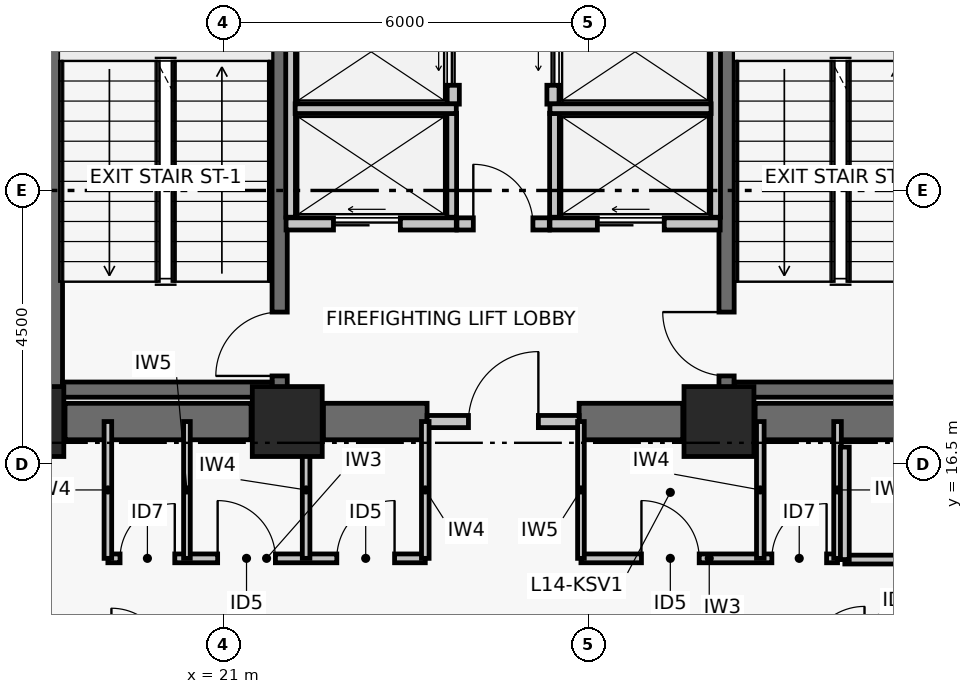
"""IFC4 building model, lengths in metres.
Left out: names, types, materials, properties, quantities, classifications, styles, units other than length and angle.
Written with IfcOpenShell. Run it as: python <this file> out.ifc"""

import sys

from ifc_helpers import new_model, si_unit, direction, frame, frame_2d, origin, origin_2d, place, context, subcontext, project, spatial, rectangle, extrude, element, fill, save


model = new_model("IFC4")
c1 = context("Model", 3, precision=1e-05, world=origin(), true_north=direction((0.0, 1.0)))
c2 = subcontext(c1, "Body", "Model", "MODEL_VIEW")
j1 = project(units=[si_unit("LENGTHUNIT", "METRE"), si_unit("PLANEANGLEUNIT", "RADIAN")], contexts=[c1])
p1 = place(None, origin())
s1 = spatial("IfcSite", under=j1, at=p1, CompositionType="ELEMENT")
p2 = place(p1, origin())
s2 = spatial("IfcBuilding", under=s1, at=p2, CompositionType="ELEMENT")
p3 = place(p2, frame((0.0, 0.0, 61.08)))
s3 = spatial("IfcBuildingStorey", under=s2, at=p3, CompositionType="ELEMENT", Elevation=61.08)
for number, where, z_axis, x_axis in (
    (1, (17.8, 17.2, 0.0), (0.0, 0.0, 1.0), (1.0, 0.0, 0.0)),
    (2, (22.05, 17.2, 0.0), (0.0, 0.0, 1.0), (1.0, 0.0, 0.0)),
    (3, (29.15, 17.2, 0.0), (0.0, 0.0, 1.0), (1.0, 0.0, 0.0)),
):
    element("IfcColumn", number, at=place(p3, frame(where, z_axis=z_axis, x_axis=x_axis)), inside=s3, PredefinedType="COLUMN", context=c2, shape_type="SweptSolid", body=[
        extrude(rectangle(XDim=1.15, YDim=1.15, at=origin_2d()), origin(), (0.0, 0.0, 1.0), 3.72),
    ])
p4 = place(p3, frame((18.395, 17.2, 0.0), z_axis=(0.0, 0.0, 1.0), x_axis=(1.0, 0.0, 0.0)))
e4 = element("IfcWall", 4, at=p4, inside=s3, PredefinedType="SHEAR", context=c2, shape_type="SweptSolid", body=[
    extrude(rectangle(XDim=3.06, YDim=0.6, at=frame_2d((1.53, 0.0))), origin(), (0.0, 0.0, 1.0), 3.47),
])
p5 = place(p3, frame((22.645, 17.2, 0.0), z_axis=(0.0, 0.0, 1.0), x_axis=(1.0, 0.0, 0.0)))
e5 = element("IfcWall", 5, at=p5, inside=s3, PredefinedType="SHEAR", context=c2, shape_type="SweptSolid", body=[
    extrude(rectangle(XDim=1.705, YDim=0.6, at=frame_2d((0.853, 0.0))), origin(), (0.0, 0.0, 1.0), 3.47),
])
p6 = place(p3, frame((26.85, 17.2, 0.0), z_axis=(0.0, 0.0, 1.0), x_axis=(1.0, 0.0, 0.0)))
e6 = element("IfcWall", 6, at=p6, inside=s3, PredefinedType="SHEAR", context=c2, shape_type="SweptSolid", body=[
    extrude(rectangle(XDim=1.705, YDim=0.6, at=frame_2d((0.853, 0.0))), origin(), (0.0, 0.0, 1.0), 3.47),
])
p7 = place(p3, frame((29.745, 17.2, 0.0), z_axis=(0.0, 0.0, 1.0), x_axis=(1.0, 0.0, 0.0)))
e7 = element("IfcWall", 7, at=p7, inside=s3, PredefinedType="SHEAR", context=c2, shape_type="SweptSolid", body=[
    extrude(rectangle(XDim=3.06, YDim=0.6, at=frame_2d((1.53, 0.0))), origin(), (0.0, 0.0, 1.0), 3.47),
])
p8 = place(p3, frame((18.229, 17.6, 0.0), z_axis=(0.0, 0.0, 1.0), x_axis=(0.0, 1.0, 0.0)))
e8 = element("IfcWall", 8, at=p8, inside=s3, PredefinedType="SHEAR", context=c2, shape_type="SweptSolid", body=[
    extrude(rectangle(XDim=8.8, YDim=0.25, at=frame_2d((4.4, 0.0))), origin(), (0.0, 0.0, 1.0), 3.47),
])
p9 = place(p3, frame((21.925, 17.6, 0.0), z_axis=(0.0, 0.0, 1.0), x_axis=(0.0, 1.0, 0.0)))
e9 = element("IfcWall", 9, at=p9, inside=s3, PredefinedType="SHEAR", context=c2, shape_type="SweptSolid", body=[
    extrude(rectangle(XDim=8.8, YDim=0.25, at=frame_2d((4.4, 0.0))), origin(), (0.0, 0.0, 1.0), 3.47),
])
p10 = place(p9, frame((0.35, 0.0, 0.0)))
e10 = element("IfcOpeningElement", 10, at=p10, cuts=e9, PredefinedType="OPENING", context=c2, shape_type="SweptSolid", body=[
    extrude(rectangle(XDim=1.05, YDim=2.08, at=frame_2d((0.525, 1.04))), frame((0.0, 0.135, 0.0), z_axis=(0.0, -1.0, 0.0), x_axis=(1.0, 0.0, 0.0)), (0.0, 0.0, 1.0), 0.27),
])
p11 = place(p3, frame((18.354, 17.725, 0.0), z_axis=(0.0, 0.0, 1.0), x_axis=(1.0, 0.0, 0.0)))
e11 = element("IfcWall", 11, at=p11, inside=s3, PredefinedType="SHEAR", context=c2, shape_type="SweptSolid", body=[
    extrude(rectangle(XDim=3.446, YDim=0.25, at=frame_2d((1.723, 0.0))), origin(), (0.0, 0.0, 1.0), 3.47),
])
p12 = place(p3, frame((29.275, 17.6, 0.0), z_axis=(0.0, 0.0, 1.0), x_axis=(0.0, 1.0, 0.0)))
e12 = element("IfcWall", 12, at=p12, inside=s3, PredefinedType="SHEAR", context=c2, shape_type="SweptSolid", body=[
    extrude(rectangle(XDim=8.8, YDim=0.25, at=frame_2d((4.4, 0.0))), origin(), (0.0, 0.0, 1.0), 3.47),
])
p13 = place(p12, frame((0.35, 0.0, 0.0)))
e13 = element("IfcOpeningElement", 13, at=p13, cuts=e12, PredefinedType="OPENING", context=c2, shape_type="SweptSolid", body=[
    extrude(rectangle(XDim=1.05, YDim=2.08, at=frame_2d((0.525, 1.04))), frame((0.0, 0.135, 0.0), z_axis=(0.0, -1.0, 0.0), x_axis=(1.0, 0.0, 0.0)), (0.0, 0.0, 1.0), 0.27),
])
p14 = place(p3, frame((29.4, 17.725, 0.0), z_axis=(0.0, 0.0, 1.0), x_axis=(1.0, 0.0, 0.0)))
e14 = element("IfcWall", 14, at=p14, inside=s3, PredefinedType="SHEAR", context=c2, shape_type="SweptSolid", body=[
    extrude(rectangle(XDim=3.446, YDim=0.25, at=frame_2d((1.723, 0.0))), origin(), (0.0, 0.0, 1.0), 3.47),
])
p15 = place(p3, frame((24.35, 17.2, 0.0), z_axis=(0.0, 0.0, 1.0), x_axis=(1.0, 0.0, 0.0)))
e15 = element("IfcWall", 15, at=p15, inside=s3, PredefinedType="PARTITIONING", context=c2, shape_type="SweptSolid", body=[
    extrude(rectangle(XDim=2.5, YDim=0.2, at=frame_2d((1.25, 0.0))), origin(), (0.0, 0.0, 1.0), 2.6),
])
p16 = place(p15, frame((0.68, 0.0, 0.0)))
e16 = element("IfcOpeningElement", 16, at=p16, cuts=e15, PredefinedType="OPENING", context=c2, shape_type="SweptSolid", body=[
    extrude(rectangle(XDim=1.15, YDim=2.08, at=frame_2d((0.575, 1.04))), frame((0.0, 0.11, 0.0), z_axis=(0.0, -1.0, 0.0), x_axis=(1.0, 0.0, 0.0)), (0.0, 0.0, 1.0), 0.22),
])
p17 = place(p3, frame((24.84, 20.45, 0.0), z_axis=(0.0, 0.0, 1.0), x_axis=(1.0, 0.0, 0.0)))
e17 = element("IfcWall", 17, at=p17, inside=s3, PredefinedType="PARTITIONING", context=c2, shape_type="SweptSolid", body=[
    extrude(rectangle(XDim=1.52, YDim=0.2, at=frame_2d((0.76, 0.0))), origin(), (0.0, 0.0, 1.0), 3.47),
])
p18 = place(p17, frame((0.27, 0.0, 0.0)))
e18 = element("IfcOpeningElement", 18, at=p18, cuts=e17, PredefinedType="OPENING", context=c2, shape_type="SweptSolid", body=[
    extrude(rectangle(XDim=0.98, YDim=2.06, at=frame_2d((0.49, 1.03))), frame((0.0, 0.11, 0.0), z_axis=(0.0, -1.0, 0.0), x_axis=(1.0, 0.0, 0.0)), (0.0, 0.0, 1.0), 0.22),
])
p19 = place(p3, frame((22.03, 20.45, 0.0), z_axis=(0.0, 0.0, 1.0), x_axis=(1.0, 0.0, 0.0)))
e19 = element("IfcWall", 19, at=p19, inside=s3, PredefinedType="PARTITIONING", context=c2, shape_type="SweptSolid", body=[
    extrude(rectangle(XDim=2.8, YDim=0.2, at=frame_2d((1.4, 0.0))), origin(), (0.0, 0.0, 1.0), 3.47),
])
p20 = place(p19, frame((0.78, 0.0, 0.0)))
e20 = element("IfcOpeningElement", 20, at=p20, cuts=e19, PredefinedType="OPENING", context=c2, shape_type="SweptSolid", body=[
    extrude(rectangle(XDim=1.1, YDim=2.08, at=frame_2d((0.55, 1.04))), frame((0.0, 0.11, 0.0), z_axis=(0.0, -1.0, 0.0), x_axis=(1.0, 0.0, 0.0)), (0.0, 0.0, 1.0), 0.22),
])
p21 = place(p3, frame((26.37, 20.45, 0.0), z_axis=(0.0, 0.0, 1.0), x_axis=(1.0, 0.0, 0.0)))
e21 = element("IfcWall", 21, at=p21, inside=s3, PredefinedType="PARTITIONING", context=c2, shape_type="SweptSolid", body=[
    extrude(rectangle(XDim=2.8, YDim=0.2, at=frame_2d((1.4, 0.0))), origin(), (0.0, 0.0, 1.0), 3.47),
])
p22 = place(p21, frame((0.78, 0.0, 0.0)))
e22 = element("IfcOpeningElement", 22, at=p22, cuts=e21, PredefinedType="OPENING", context=c2, shape_type="SweptSolid", body=[
    extrude(rectangle(XDim=1.1, YDim=2.08, at=frame_2d((0.55, 1.04))), frame((0.0, 0.11, 0.0), z_axis=(0.0, -1.0, 0.0), x_axis=(1.0, 0.0, 0.0)), (0.0, 0.0, 1.0), 0.22),
])
p23 = place(p3, frame((24.78, 22.42, 0.0), z_axis=(0.0, 0.0, 1.0), x_axis=(0.0, 1.0, 0.0)))
e23 = element("IfcWall", 23, at=p23, inside=s3, PredefinedType="PARTITIONING", context=c2, shape_type="SweptSolid", body=[
    extrude(rectangle(XDim=1.72, YDim=0.2, at=frame_2d((0.86, 0.0))), origin(), (0.0, 0.0, 1.0), 3.47),
])
p24 = place(p23, frame((0.31, 0.0, 0.0)))
e24 = element("IfcOpeningElement", 24, at=p24, cuts=e23, PredefinedType="OPENING", context=c2, shape_type="SweptSolid", body=[
    extrude(rectangle(XDim=1.1, YDim=2.08, at=frame_2d((0.55, 1.04))), frame((0.0, 0.11, 0.0), z_axis=(0.0, -1.0, 0.0), x_axis=(1.0, 0.0, 0.0)), (0.0, 0.0, 1.0), 0.22),
])
p25 = place(p3, frame((26.42, 22.42, 0.0), z_axis=(0.0, 0.0, 1.0), x_axis=(0.0, 1.0, 0.0)))
e25 = element("IfcWall", 25, at=p25, inside=s3, PredefinedType="PARTITIONING", context=c2, shape_type="SweptSolid", body=[
    extrude(rectangle(XDim=1.72, YDim=0.2, at=frame_2d((0.86, 0.0))), origin(), (0.0, 0.0, 1.0), 3.47),
])
p26 = place(p25, frame((0.31, 0.0, 0.0)))
e26 = element("IfcOpeningElement", 26, at=p26, cuts=e25, PredefinedType="OPENING", context=c2, shape_type="SweptSolid", body=[
    extrude(rectangle(XDim=1.1, YDim=2.08, at=frame_2d((0.55, 1.04))), frame((0.0, 0.11, 0.0), z_axis=(0.0, -1.0, 0.0), x_axis=(1.0, 0.0, 0.0)), (0.0, 0.0, 1.0), 0.22),
])
p27 = place(p3, frame((22.105, 20.56, 0.0), z_axis=(0.0, 0.0, 1.0), x_axis=(0.0, 1.0, 0.0)))
e27 = element("IfcWall", 27, at=p27, inside=s3, PredefinedType="PARTITIONING", context=c2, shape_type="SweptSolid", body=[
    extrude(rectangle(XDim=5.45, YDim=0.16, at=frame_2d((2.725, 0.0))), origin(), (0.0, 0.0, 1.0), 3.47),
])
p28 = place(p3, frame((24.755, 20.56, 0.0), z_axis=(0.0, 0.0, 1.0), x_axis=(0.0, 1.0, 0.0)))
e28 = element("IfcWall", 28, at=p28, inside=s3, PredefinedType="PARTITIONING", context=c2, shape_type="SweptSolid", body=[
    extrude(rectangle(XDim=1.71, YDim=0.16, at=frame_2d((0.855, 0.0))), origin(), (0.0, 0.0, 1.0), 3.47),
])
p29 = place(p3, frame((22.18, 22.345, 0.0), z_axis=(0.0, 0.0, 1.0), x_axis=(1.0, 0.0, 0.0)))
e29 = element("IfcWall", 29, at=p29, inside=s3, PredefinedType="PARTITIONING", context=c2, shape_type="SweptSolid", body=[
    extrude(rectangle(XDim=2.65, YDim=0.16, at=frame_2d((1.325, 0.0))), origin(), (0.0, 0.0, 1.0), 3.47),
])
p30 = place(p3, frame((29.095, 20.56, 0.0), z_axis=(0.0, 0.0, 1.0), x_axis=(0.0, 1.0, 0.0)))
e30 = element("IfcWall", 30, at=p30, inside=s3, PredefinedType="PARTITIONING", context=c2, shape_type="SweptSolid", body=[
    extrude(rectangle(XDim=5.45, YDim=0.16, at=frame_2d((2.725, 0.0))), origin(), (0.0, 0.0, 1.0), 3.47),
])
p31 = place(p3, frame((26.445, 20.56, 0.0), z_axis=(0.0, 0.0, 1.0), x_axis=(0.0, 1.0, 0.0)))
e31 = element("IfcWall", 31, at=p31, inside=s3, PredefinedType="PARTITIONING", context=c2, shape_type="SweptSolid", body=[
    extrude(rectangle(XDim=1.71, YDim=0.16, at=frame_2d((0.855, 0.0))), origin(), (0.0, 0.0, 1.0), 3.47),
])
p32 = place(p3, frame((26.37, 22.345, 0.0), z_axis=(0.0, 0.0, 1.0), x_axis=(1.0, 0.0, 0.0)))
e32 = element("IfcWall", 32, at=p32, inside=s3, PredefinedType="PARTITIONING", context=c2, shape_type="SweptSolid", body=[
    extrude(rectangle(XDim=2.65, YDim=0.16, at=frame_2d((1.325, 0.0))), origin(), (0.0, 0.0, 1.0), 3.47),
])
p33 = place(p3, frame((19.1, 14.95, 0.0), z_axis=(0.0, 0.0, 1.0), x_axis=(1.0, 0.0, 0.0)))
e33 = element("IfcWall", 33, at=p33, inside=s3, PredefinedType="PARTITIONING", context=c2, shape_type="SweptSolid", body=[
    extrude(rectangle(XDim=5.22, YDim=0.145, at=frame_2d((2.61, 0.0))), origin(), (0.0, 0.0, 1.0), 2.6),
])
p34 = place(p33, frame((0.2, 0.0, 0.0)))
e34 = element("IfcOpeningElement", 34, at=p34, cuts=e33, PredefinedType="OPENING", context=c2, shape_type="SweptSolid", body=[
    extrude(rectangle(XDim=0.9, YDim=2.02, at=frame_2d((0.45, 1.01))), frame((0.0, 0.083, 0.0), z_axis=(0.0, -1.0, 0.0), x_axis=(1.0, 0.0, 0.0)), (0.0, 0.0, 1.0), 0.165),
])
p35 = place(p33, frame((1.805, 0.0, 0.0)))
e35 = element("IfcOpeningElement", 35, at=p35, cuts=e33, PredefinedType="OPENING", context=c2, shape_type="SweptSolid", body=[
    extrude(rectangle(XDim=0.95, YDim=2.06, at=frame_2d((0.475, 1.03))), frame((0.0, 0.083, 0.0), z_axis=(0.0, -1.0, 0.0), x_axis=(1.0, 0.0, 0.0)), (0.0, 0.0, 1.0), 0.165),
])
p36 = place(p33, frame((3.765, 0.0, 0.0)))
e36 = element("IfcOpeningElement", 36, at=p36, cuts=e33, PredefinedType="OPENING", context=c2, shape_type="SweptSolid", body=[
    extrude(rectangle(XDim=0.95, YDim=2.06, at=frame_2d((0.475, 1.03))), frame((0.0, 0.083, 0.0), z_axis=(0.0, -1.0, 0.0), x_axis=(1.0, 0.0, 0.0)), (0.0, 0.0, 1.0), 0.165),
])
p37 = place(p3, frame((26.88, 14.95, 0.0), z_axis=(0.0, 0.0, 1.0), x_axis=(1.0, 0.0, 0.0)))
e37 = element("IfcWall", 37, at=p37, inside=s3, PredefinedType="PARTITIONING", context=c2, shape_type="SweptSolid", body=[
    extrude(rectangle(XDim=4.22, YDim=0.145, at=frame_2d((2.11, 0.0))), origin(), (0.0, 0.0, 1.0), 3.0),
])
p38 = place(p37, frame((0.995, 0.0, 0.0)))
e38 = element("IfcOpeningElement", 38, at=p38, cuts=e37, PredefinedType="OPENING", context=c2, shape_type="SweptSolid", body=[
    extrude(rectangle(XDim=0.95, YDim=2.06, at=frame_2d((0.475, 1.03))), frame((0.0, 0.083, 0.0), z_axis=(0.0, -1.0, 0.0), x_axis=(1.0, 0.0, 0.0)), (0.0, 0.0, 1.0), 0.165),
])
p39 = place(p37, frame((3.14, 0.0, 0.0)))
e39 = element("IfcOpeningElement", 39, at=p39, cuts=e37, PredefinedType="OPENING", context=c2, shape_type="SweptSolid", body=[
    extrude(rectangle(XDim=0.9, YDim=2.02, at=frame_2d((0.45, 1.01))), frame((0.0, 0.083, 0.0), z_axis=(0.0, -1.0, 0.0), x_axis=(1.0, 0.0, 0.0)), (0.0, 0.0, 1.0), 0.165),
])
p40 = place(p3, frame((19.1, 14.95, 0.0), z_axis=(0.0, 0.0, 1.0), x_axis=(0.0, 1.0, 0.0)))
e40 = element("IfcWall", 40, at=p40, inside=s3, PredefinedType="PARTITIONING", context=c2, shape_type="SweptSolid", body=[
    extrude(rectangle(XDim=2.25, YDim=0.125, at=frame_2d((1.125, 0.0))), origin(), (0.0, 0.0, 1.0), 2.6),
])
p41 = place(p3, frame((20.4, 14.95, 0.0), z_axis=(0.0, 0.0, 1.0), x_axis=(0.0, 1.0, 0.0)))
e41 = element("IfcWall", 41, at=p41, inside=s3, PredefinedType="PARTITIONING", context=c2, shape_type="SweptSolid", body=[
    extrude(rectangle(XDim=2.25, YDim=0.11, at=frame_2d((1.125, 0.0))), origin(), (0.0, 0.0, 1.0), 2.6),
])
for number, where, z_axis, x_axis in (
    (42, (22.36, 14.95, 0.0), (0.0, 0.0, 1.0), (0.0, 1.0, 0.0)),
    (43, (24.32, 14.95, 0.0), (0.0, 0.0, 1.0), (0.0, 1.0, 0.0)),
):
    element("IfcWall", number, at=place(p3, frame(where, z_axis=z_axis, x_axis=x_axis)), inside=s3, PredefinedType="PARTITIONING", context=c2, shape_type="SweptSolid", body=[
        extrude(rectangle(XDim=2.25, YDim=0.125, at=frame_2d((1.125, 0.0))), origin(), (0.0, 0.0, 1.0), 2.6),
    ])
p42 = place(p3, frame((26.88, 14.95, 0.0), z_axis=(0.0, 0.0, 1.0), x_axis=(0.0, 1.0, 0.0)))
e44 = element("IfcWall", 44, at=p42, inside=s3, PredefinedType="PARTITIONING", context=c2, shape_type="SweptSolid", body=[
    extrude(rectangle(XDim=2.25, YDim=0.11, at=frame_2d((1.125, 0.0))), origin(), (0.0, 0.0, 1.0), 2.6),
])
for number, where, z_axis, x_axis in (
    (45, (29.83, 14.95, 0.0), (0.0, 0.0, 1.0), (0.0, 1.0, 0.0)),
    (46, (31.1, 14.95, 0.0), (0.0, 0.0, 1.0), (0.0, 1.0, 0.0)),
):
    element("IfcWall", number, at=place(p3, frame(where, z_axis=z_axis, x_axis=x_axis)), inside=s3, PredefinedType="PARTITIONING", context=c2, shape_type="SweptSolid", body=[
        extrude(rectangle(XDim=2.25, YDim=0.125, at=frame_2d((1.125, 0.0))), origin(), (0.0, 0.0, 1.0), 2.6),
    ])
p43 = place(p3, frame((32.8, 14.93, 0.0), z_axis=(0.0, 0.0, 1.0), x_axis=(-1.0, 0.0, 0.0)))
e47 = element("IfcWall", 47, at=p43, inside=s3, PredefinedType="PARTITIONING", context=c2, shape_type="SweptSolid", body=[
    extrude(rectangle(XDim=1.58, YDim=0.145, at=frame_2d((0.79, 0.0))), origin(), (0.0, 0.0, 1.0), 2.85),
])
p44 = place(p3, frame((31.22, 14.93, 0.0), z_axis=(0.0, 0.0, 1.0), x_axis=(0.0, 1.0, 0.0)))
e48 = element("IfcWall", 48, at=p44, inside=s3, PredefinedType="PARTITIONING", context=c2, shape_type="SweptSolid", body=[
    extrude(rectangle(XDim=1.85, YDim=0.145, at=frame_2d((0.925, 0.0))), origin(), (0.0, 0.0, 1.0), 2.6),
])
p45 = place(p10, origin())
e49 = element("IfcDoor", 49, at=p45, inside=s3, OperationType="SINGLE_SWING_LEFT", PredefinedType="DOOR", context=c2, shape_type="SweptSolid", body=[
    extrude(rectangle(XDim=1.05, YDim=2.08, at=frame_2d((0.525, 1.04))), frame((0.0, 0.025, 0.0), z_axis=(0.0, -1.0, 0.0), x_axis=(1.0, 0.0, 0.0)), (0.0, 0.0, 1.0), 0.05),
])
fill(e10, e49)
p46 = place(p13, origin())
e50 = element("IfcDoor", 50, at=p46, inside=s3, OperationType="SINGLE_SWING_RIGHT", PredefinedType="DOOR", context=c2, shape_type="SweptSolid", body=[
    extrude(rectangle(XDim=1.05, YDim=2.08, at=frame_2d((0.525, 1.04))), frame((0.0, 0.025, 0.0), z_axis=(0.0, -1.0, 0.0), x_axis=(1.0, 0.0, 0.0)), (0.0, 0.0, 1.0), 0.05),
])
fill(e13, e50)
p47 = place(p16, origin())
e51 = element("IfcDoor", 51, at=p47, inside=s3, OperationType="SINGLE_SWING_RIGHT", PredefinedType="DOOR", context=c2, shape_type="SweptSolid", body=[
    extrude(rectangle(XDim=1.15, YDim=2.08, at=frame_2d((0.575, 1.04))), frame((0.0, 0.025, 0.0), z_axis=(0.0, -1.0, 0.0), x_axis=(1.0, 0.0, 0.0)), (0.0, 0.0, 1.0), 0.05),
])
fill(e16, e51)
p48 = place(p18, origin())
e52 = element("IfcDoor", 52, at=p48, inside=s3, OperationType="SINGLE_SWING_LEFT", PredefinedType="DOOR", context=c2, shape_type="SweptSolid", body=[
    extrude(rectangle(XDim=0.98, YDim=2.06, at=frame_2d((0.49, 1.03))), frame((0.0, 0.025, 0.0), z_axis=(0.0, -1.0, 0.0), x_axis=(1.0, 0.0, 0.0)), (0.0, 0.0, 1.0), 0.05),
])
fill(e18, e52)
p49 = place(p20, origin())
e53 = element("IfcDoor", 53, at=p49, inside=s3, OperationType="DOUBLE_DOOR_SLIDING", PredefinedType="DOOR", context=c2, shape_type="SweptSolid", body=[
    extrude(rectangle(XDim=1.1, YDim=2.08, at=frame_2d((0.55, 1.04))), frame((0.0, 0.025, 0.0), z_axis=(0.0, -1.0, 0.0), x_axis=(1.0, 0.0, 0.0)), (0.0, 0.0, 1.0), 0.05),
])
fill(e20, e53)
p50 = place(p22, origin())
e54 = element("IfcDoor", 54, at=p50, inside=s3, OperationType="DOUBLE_DOOR_SLIDING", PredefinedType="DOOR", context=c2, shape_type="SweptSolid", body=[
    extrude(rectangle(XDim=1.1, YDim=2.08, at=frame_2d((0.55, 1.04))), frame((0.0, 0.025, 0.0), z_axis=(0.0, -1.0, 0.0), x_axis=(1.0, 0.0, 0.0)), (0.0, 0.0, 1.0), 0.05),
])
fill(e22, e54)
p51 = place(p24, origin())
e55 = element("IfcDoor", 55, at=p51, inside=s3, OperationType="DOUBLE_DOOR_SLIDING", PredefinedType="DOOR", context=c2, shape_type="SweptSolid", body=[
    extrude(rectangle(XDim=1.1, YDim=2.08, at=frame_2d((0.55, 1.04))), frame((0.0, 0.025, 0.0), z_axis=(0.0, -1.0, 0.0), x_axis=(1.0, 0.0, 0.0)), (0.0, 0.0, 1.0), 0.05),
])
fill(e24, e55)
p52 = place(p26, origin())
e56 = element("IfcDoor", 56, at=p52, inside=s3, OperationType="DOUBLE_DOOR_SLIDING", PredefinedType="DOOR", context=c2, shape_type="SweptSolid", body=[
    extrude(rectangle(XDim=1.1, YDim=2.08, at=frame_2d((0.55, 1.04))), frame((0.0, 0.025, 0.0), z_axis=(0.0, -1.0, 0.0), x_axis=(1.0, 0.0, 0.0)), (0.0, 0.0, 1.0), 0.05),
])
fill(e26, e56)
p53 = place(p34, origin())
e57 = element("IfcDoor", 57, at=p53, inside=s3, OperationType="SINGLE_SWING_RIGHT", PredefinedType="DOOR", context=c2, shape_type="SweptSolid", body=[
    extrude(rectangle(XDim=0.9, YDim=2.02, at=frame_2d((0.45, 1.01))), frame((0.0, 0.025, 0.0), z_axis=(0.0, -1.0, 0.0), x_axis=(1.0, 0.0, 0.0)), (0.0, 0.0, 1.0), 0.05),
])
fill(e34, e57)
p54 = place(p35, origin())
e58 = element("IfcDoor", 58, at=p54, inside=s3, OperationType="SINGLE_SWING_LEFT", PredefinedType="DOOR", context=c2, shape_type="SweptSolid", body=[
    extrude(rectangle(XDim=0.95, YDim=2.06, at=frame_2d((0.475, 1.03))), frame((0.0, 0.025, 0.0), z_axis=(0.0, -1.0, 0.0), x_axis=(1.0, 0.0, 0.0)), (0.0, 0.0, 1.0), 0.05),
])
fill(e35, e58)
p55 = place(p36, origin())
e59 = element("IfcDoor", 59, at=p55, inside=s3, OperationType="SINGLE_SWING_RIGHT", PredefinedType="DOOR", context=c2, shape_type="SweptSolid", body=[
    extrude(rectangle(XDim=0.95, YDim=2.06, at=frame_2d((0.475, 1.03))), frame((0.0, 0.025, 0.0), z_axis=(0.0, -1.0, 0.0), x_axis=(1.0, 0.0, 0.0)), (0.0, 0.0, 1.0), 0.05),
])
fill(e36, e59)
p56 = place(p38, origin())
e60 = element("IfcDoor", 60, at=p56, inside=s3, OperationType="SINGLE_SWING_LEFT", PredefinedType="DOOR", context=c2, shape_type="SweptSolid", body=[
    extrude(rectangle(XDim=0.95, YDim=2.06, at=frame_2d((0.475, 1.03))), frame((0.0, 0.025, 0.0), z_axis=(0.0, -1.0, 0.0), x_axis=(1.0, 0.0, 0.0)), (0.0, 0.0, 1.0), 0.05),
])
fill(e38, e60)
p57 = place(p39, origin())
e61 = element("IfcDoor", 61, at=p57, inside=s3, OperationType="SINGLE_SWING_RIGHT", PredefinedType="DOOR", context=c2, shape_type="SweptSolid", body=[
    extrude(rectangle(XDim=0.9, YDim=2.02, at=frame_2d((0.45, 1.01))), frame((0.0, 0.025, 0.0), z_axis=(0.0, -1.0, 0.0), x_axis=(1.0, 0.0, 0.0)), (0.0, 0.0, 1.0), 0.05),
])
fill(e39, e61)
save(model, sys.argv[1])
